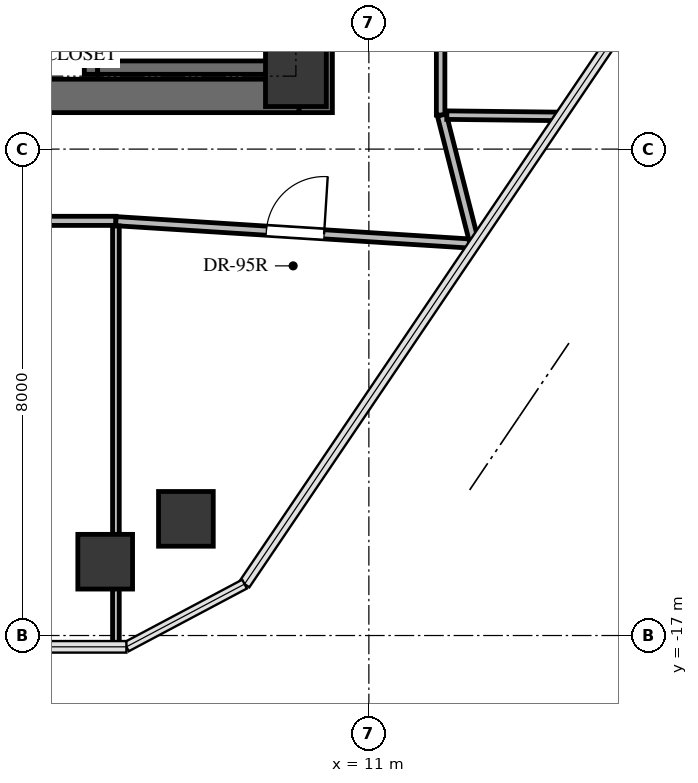
"""IFC4 building model, lengths in metres.
Left out: names, types, materials, properties, quantities, classifications, styles, units other than length and angle.
Written with IfcOpenShell. Run it as: python <this file> out.ifc"""

import sys

from ifc_helpers import new_model, si_unit, direction, frame, frame_2d, origin, origin_2d, place, context, subcontext, project, spatial, rectangle, extrude, source, transform, mapped, element, fill, save


model = new_model("IFC4")
c1 = context("Model", 3, precision=1e-05, world=origin(), true_north=direction((0.0, 1.0)))
c2 = subcontext(c1, "Body", "Model", "MODEL_VIEW")
j1 = project(units=[si_unit("LENGTHUNIT", "METRE"), si_unit("PLANEANGLEUNIT", "RADIAN")], contexts=[c1])
p1 = place(None, origin())
s1 = spatial("IfcSite", under=j1, at=p1, CompositionType="ELEMENT")
p2 = place(p1, origin())
s2 = spatial("IfcBuilding", under=s1, at=p2, CompositionType="ELEMENT")
p3 = place(p2, frame((0.0, 0.0, 244.7)))
s3 = spatial("IfcBuildingStorey", under=s2, at=p3, CompositionType="ELEMENT", Elevation=244.7)
p4 = place(p3, frame((10.125, -8.4, 0.0), z_axis=(0.0, 0.0, 1.0), x_axis=(0.0, 1.0, 0.0)))
e1 = element("IfcWall", 1, at=p4, inside=s3, PredefinedType="SHEAR", context=c2, shape_type="SweptSolid", body=[
    extrude(rectangle(XDim=16.8, YDim=0.55, at=frame_2d((8.4, 0.0))), origin(), (0.0, 0.0, 1.0), 3.3),
])
p5 = place(p3, frame((2.1, -8.125, 0.0), z_axis=(0.0, 0.0, 1.0), x_axis=(1.0, 0.0, 0.0)))
e2 = element("IfcWall", 2, at=p5, inside=s3, PredefinedType="SHEAR", context=c2, shape_type="SweptSolid", body=[
    extrude(rectangle(XDim=7.75, YDim=0.55, at=frame_2d((3.875, 0.0))), origin(), (0.0, 0.0, 1.0), 3.3),
])
p6 = place(p3, frame((9.61, -7.77, -0.24), z_axis=(0.0, 0.0, 1.0), x_axis=(0.0, 1.0, 0.0)))
e3 = element("IfcWall", 3, at=p6, inside=s3, PredefinedType="SHEAR", context=c2, shape_type="SweptSolid", body=[
    extrude(rectangle(XDim=7.89, YDim=0.22, at=frame_2d((3.945, 0.0))), origin(), (0.0, 0.0, 1.0), 3.3),
])
p7 = place(p3, frame((6.43, 0.12, -0.24), z_axis=(0.0, 0.0, 1.0), x_axis=(0.0, -1.0, 0.0)))
e4 = element("IfcWall", 4, at=p7, inside=s3, PredefinedType="SHEAR", context=c2, shape_type="SweptSolid", body=[
    extrude(rectangle(XDim=7.89, YDim=0.22, at=frame_2d((3.945, 0.0))), origin(), (0.0, 0.0, 1.0), 3.3),
])
p8 = place(p7, frame((0.52, 0.0, 0.0)))
e5 = element("IfcOpeningElement", 5, at=p8, cuts=e4, PredefinedType="OPENING", context=c2, shape_type="SweptSolid", body=[
    extrude(rectangle(XDim=1.05, YDim=2.15, at=frame_2d((0.525, 1.075))), frame((0.0, 0.12, 0.0), z_axis=(0.0, -1.0, 0.0), x_axis=(1.0, 0.0, 0.0)), (0.0, 0.0, 1.0), 0.24),
])
p9 = place(p3, frame((6.54, -7.66, -0.24), z_axis=(0.0, 0.0, 1.0), x_axis=(1.0, 0.0, 0.0)))
e6 = element("IfcWall", 6, at=p9, inside=s3, PredefinedType="SHEAR", context=c2, shape_type="SweptSolid", body=[
    extrude(rectangle(XDim=2.96, YDim=0.22, at=frame_2d((1.48, 0.0))), origin(), (0.0, 0.0, 1.0), 3.3),
])
m1 = source(origin(), c2, "Body", "SweptSolid", [
    extrude(rectangle(XDim=1.0, YDim=1.0, at=origin_2d()), origin(), (0.0, 0.0, 1.0), 3.3),
])
p10 = place(p3, frame((9.8, -7.8, -0.24), z_axis=(0.0, 0.0, 1.0), x_axis=(1.0, 0.0, 0.0)))
e7 = element("IfcColumn", 7, at=p10, inside=s3, PredefinedType="COLUMN", context=c2, shape_type="MappedRepresentation", body=[
    mapped(m1, transform((0.0, 0.0, 0.0), x_axis=(1.0, 0.0, 0.0), y_axis=(0.0, 1.0, 0.0), z_axis=(0.0, 0.0, 1.0), scale=1.0)),
])
m2 = source(origin(), c2, "Body", "SweptSolid", [
    extrude(rectangle(XDim=0.9, YDim=0.9, at=origin_2d()), origin(), (0.0, 0.0, 1.0), 3.3),
])
for number, where, z_axis, x_axis in (
    (8, (7.991, -15.081, -0.24), (0.0, 0.0, 1.0), (1.0, 0.0, 0.0)),
    (9, (6.664, -15.786, -0.24), (0.0, 0.0, 1.0), (1.0, 0.0, 0.0)),
):
    element("IfcColumn", number, at=place(p3, frame(where, z_axis=z_axis, x_axis=x_axis)), inside=s3, PredefinedType="COLUMN", context=c2, shape_type="MappedRepresentation", body=[
        mapped(m2, transform((0.0, 0.0, 0.0), x_axis=(1.0, 0.0, 0.0), y_axis=(0.0, 1.0, 0.0), z_axis=(0.0, 0.0, 1.0), scale=1.0)),
    ])
p11 = place(p3, frame((12.18, -8.44, 0.0), z_axis=(0.0, 0.0, 1.0), x_axis=(0.0, 1.0, 0.0)))
e10 = element("IfcWall", 10, at=p11, inside=s3, PredefinedType="PARTITIONING", context=c2, shape_type="SweptSolid", body=[
    extrude(rectangle(XDim=3.48, YDim=0.14, at=frame_2d((1.74, 0.0))), origin(), (0.0, 0.0, 1.0), 2.399),
])
p12 = place(p11, frame((1.29, 0.0, 0.0)))
e11 = element("IfcOpeningElement", 11, at=p12, cuts=e10, PredefinedType="OPENING", context=c2, shape_type="SweptSolid", body=[
    extrude(rectangle(XDim=0.9, YDim=2.05, at=frame_2d((0.45, 1.025))), frame((0.0, 0.08, 0.0), z_axis=(0.0, -1.0, 0.0), x_axis=(1.0, 0.0, 0.0)), (0.0, 0.0, 1.0), 0.16),
])
p13 = place(p3, frame((2.84, -10.18, 0.0), z_axis=(0.0, 0.0, 1.0), x_axis=(1.0, 0.0, 0.0)))
e12 = element("IfcWall", 12, at=p13, inside=s3, PredefinedType="PARTITIONING", context=c2, shape_type="SweptSolid", body=[
    extrude(rectangle(XDim=4.0, YDim=0.15, at=frame_2d((2.0, 0.0))), origin(), (0.0, 0.0, 1.0), 2.301),
])
p14 = place(p13, frame((1.2, 0.0, 0.0)))
e13 = element("IfcOpeningElement", 13, at=p14, cuts=e12, PredefinedType="OPENING", context=c2, shape_type="SweptSolid", body=[
    extrude(rectangle(XDim=1.6, YDim=2.15, at=frame_2d((0.8, 1.075))), frame((0.0, 0.085, 0.0), z_axis=(0.0, -1.0, 0.0), x_axis=(1.0, 0.0, 0.0)), (0.0, 0.0, 1.0), 0.17),
])
p15 = place(p3, frame((6.84, -10.185, 0.0), z_axis=(0.0, 0.0, 1.0), x_axis=(0.99800894273, -0.063072579072, 0.0)))
e14 = element("IfcWall", 14, at=p15, inside=s3, PredefinedType="PARTITIONING", context=c2, shape_type="SweptSolid", body=[
    extrude(rectangle(XDim=5.911, YDim=0.15, at=frame_2d((2.955, 0.0))), origin(), (0.0, 0.0, 1.0), 2.399),
])
p16 = place(p15, frame((2.48, 0.0, 0.0)))
e15 = element("IfcOpeningElement", 15, at=p16, cuts=e14, PredefinedType="OPENING", context=c2, shape_type="SweptSolid", body=[
    extrude(rectangle(XDim=0.95, YDim=2.1, at=frame_2d((0.475, 1.05))), frame((0.0, 0.085, 0.0), z_axis=(0.0, -1.0, 0.0), x_axis=(1.0, 0.0, 0.0)), (0.0, 0.0, 1.0), 0.17),
])
p17 = place(p3, frame((12.719, -10.477, 0.0), z_axis=(0.0, 0.0, 1.0), x_axis=(-0.246550381988, 0.96912997536, 0.0)))
e16 = element("IfcWall", 16, at=p17, inside=s3, PredefinedType="PARTITIONING", context=c2, shape_type="SweptSolid", body=[
    extrude(rectangle(XDim=2.102, YDim=0.15, at=frame_2d((1.051, 0.0))), origin(), (0.0, 0.0, 1.0), 2.399),
])
p18 = place(p3, frame((14.156, -8.462, 0.0), z_axis=(0.0, 0.0, 1.0), x_axis=(-0.999935742613, 0.011336253532, 0.0)))
e17 = element("IfcWall", 17, at=p18, inside=s3, PredefinedType="PARTITIONING", context=c2, shape_type="SweptSolid", body=[
    extrude(rectangle(XDim=1.874, YDim=0.14, at=frame_2d((0.937, 0.0))), origin(), (0.0, 0.0, 1.0), 2.399),
])
p19 = place(p3, frame((6.84, -10.264, 0.0), z_axis=(0.0, 0.0, 1.0), x_axis=(0.0, -1.0, 0.0)))
e18 = element("IfcWall", 18, at=p19, inside=s3, PredefinedType="MOVABLE", context=c2, shape_type="SweptSolid", body=[
    extrude(rectangle(XDim=5.606, YDim=0.11, at=frame_2d((2.803, 0.0))), origin(), (0.0, 0.0, 1.0), 2.301),
])
p20 = place(p3, frame((6.84, -15.87, 0.0), z_axis=(0.0, 0.0, 1.0), x_axis=(0.0, -1.0, 0.0)))
e19 = element("IfcWall", 19, at=p20, inside=s3, PredefinedType="MOVABLE", context=c2, shape_type="SweptSolid", body=[
    extrude(rectangle(XDim=1.316, YDim=0.11, at=frame_2d((0.658, 0.0))), origin(), (0.0, 0.0, 1.0), 1.877),
])
m3 = source(origin(), c2, "Body", "SweptSolid", [
    extrude(rectangle(XDim=0.95, YDim=2.1, at=frame_2d((0.475, 1.05))), frame((0.0, 0.025, 0.0), z_axis=(0.0, -1.0, 0.0), x_axis=(1.0, 0.0, 0.0)), (0.0, 0.0, 1.0), 0.05),
])
p21 = place(p16, origin())
e20 = element("IfcDoor", 20, at=p21, inside=s3, OperationType="SINGLE_SWING_RIGHT", PredefinedType="DOOR", context=c2, shape_type="MappedRepresentation", body=[
    mapped(m3, transform((0.0, 0.0, 0.0), x_axis=(1.0, 0.0, 0.0), y_axis=(0.0, 1.0, 0.0), z_axis=(0.0, 0.0, 1.0), scale=1.0)),
])
fill(e15, e20)
save(model, sys.argv[1])
